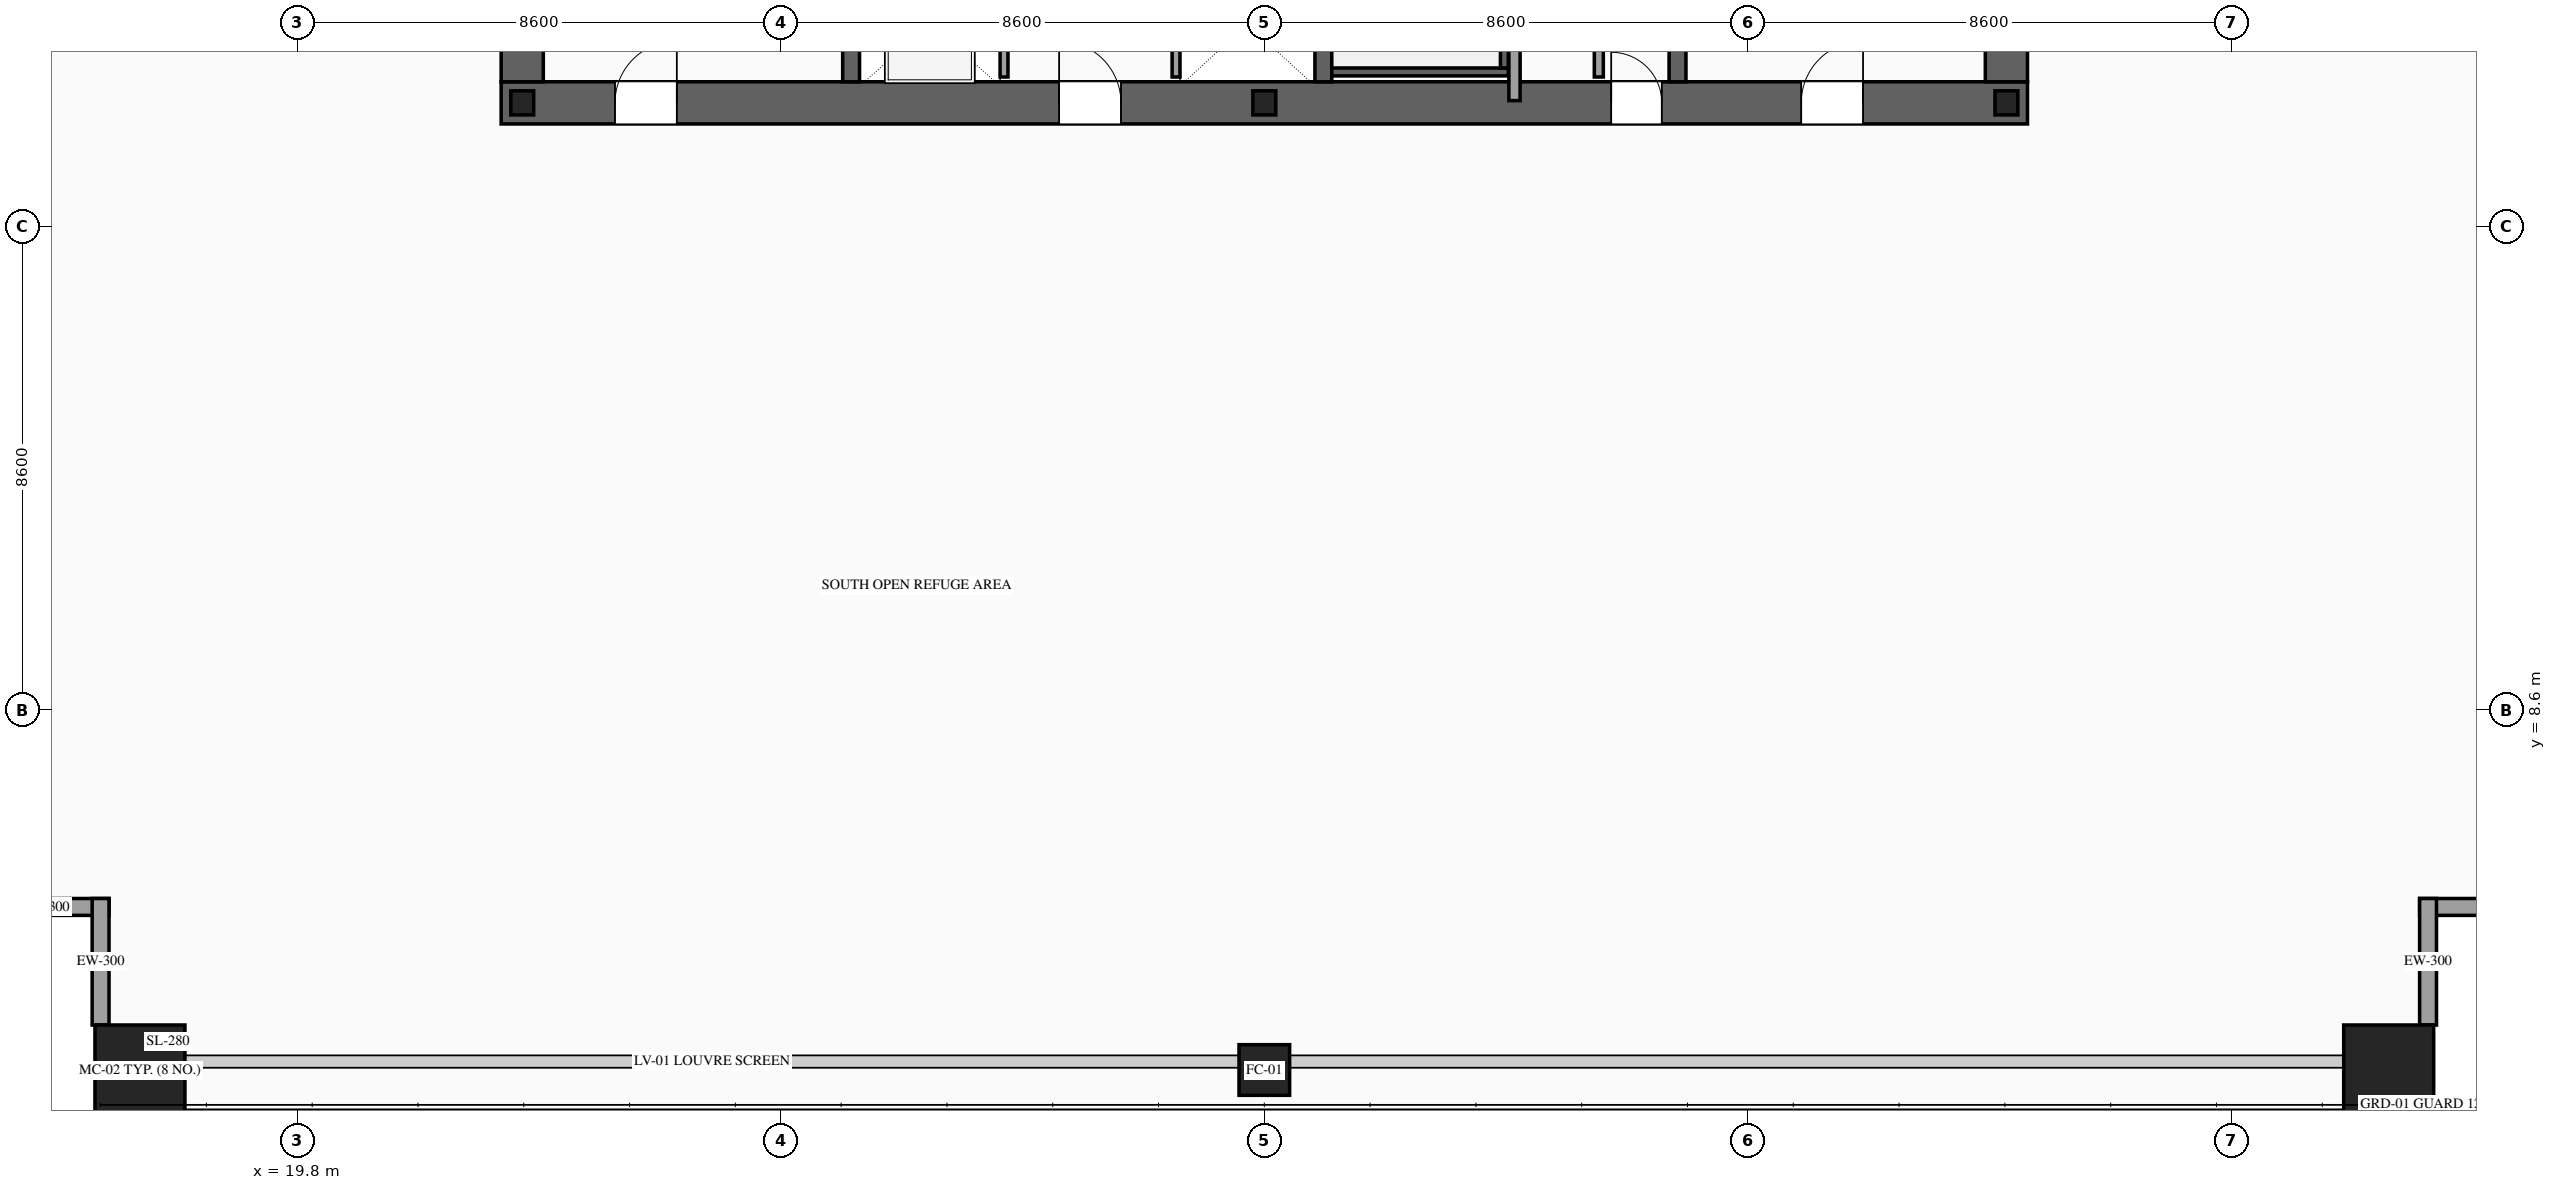
"""IFC4 building model, lengths in metres.
Left out: names, types, materials, properties, quantities, classifications, styles, units other than length and angle.
Written with IfcOpenShell. Run it as: python <this file> out.ifc"""

import sys

from ifc_helpers import new_model, si_unit, direction, frame, frame_2d, origin, origin_2d, place, context, subcontext, project, spatial, rectangle, hollow_rectangle, i_section, extrude, source, transform, mapped, element, fill, save


model = new_model("IFC4")
c1 = context("Model", 3, precision=1e-05, world=origin(), true_north=direction((0.0, 1.0)))
c2 = subcontext(c1, "Body", "Model", "MODEL_VIEW")
j1 = project(units=[si_unit("LENGTHUNIT", "METRE"), si_unit("PLANEANGLEUNIT", "RADIAN")], contexts=[c1])
p1 = place(None, origin())
s1 = spatial("IfcSite", under=j1, at=p1, CompositionType="ELEMENT")
p2 = place(p1, origin())
s2 = spatial("IfcBuilding", under=s1, at=p2, CompositionType="ELEMENT")
p3 = place(p2, frame((0.0, 0.0, 129.8)))
s3 = spatial("IfcBuildingStorey", under=s2, at=p3, CompositionType="ELEMENT", Elevation=129.8)
p4 = place(p3, frame((23.425, 19.4, 0.0), z_axis=(0.0, 0.0, 1.0), x_axis=(1.0, 0.0, 0.0)))
e1 = element("IfcWall", 1, at=p4, inside=s3, PredefinedType="SHEAR", context=c2, shape_type="SweptSolid", body=[
    extrude(rectangle(XDim=27.15, YDim=0.75, at=frame_2d((13.575, 0.0))), origin(), (0.0, 0.0, 1.0), 4.6),
])
p5 = place(p4, frame((2.025, 0.0, 0.0)))
e2 = element("IfcOpeningElement", 2, at=p5, cuts=e1, PredefinedType="OPENING", context=c2, shape_type="SweptSolid", body=[
    extrude(rectangle(XDim=1.1, YDim=2.2, at=frame_2d((0.55, 1.1))), frame((0.0, 0.39, 0.0), z_axis=(0.0, -1.0, 0.0), x_axis=(1.0, 0.0, 0.0)), (0.0, 0.0, 1.0), 0.78),
])
p6 = place(p4, frame((9.925, 0.0, 0.0)))
e3 = element("IfcOpeningElement", 3, at=p6, cuts=e1, PredefinedType="OPENING", context=c2, shape_type="SweptSolid", body=[
    extrude(rectangle(XDim=1.1, YDim=2.2, at=frame_2d((0.55, 1.1))), frame((0.0, 0.39, 0.0), z_axis=(0.0, -1.0, 0.0), x_axis=(1.0, 0.0, 0.0)), (0.0, 0.0, 1.0), 0.78),
])
p7 = place(p4, frame((23.125, 0.0, 0.0)))
e4 = element("IfcOpeningElement", 4, at=p7, cuts=e1, PredefinedType="OPENING", context=c2, shape_type="SweptSolid", body=[
    extrude(rectangle(XDim=1.1, YDim=2.2, at=frame_2d((0.55, 1.1))), frame((0.0, 0.39, 0.0), z_axis=(0.0, -1.0, 0.0), x_axis=(1.0, 0.0, 0.0)), (0.0, 0.0, 1.0), 0.78),
])
p8 = place(p4, frame((19.745, 0.0, 0.0)))
e5 = element("IfcOpeningElement", 5, at=p8, cuts=e1, PredefinedType="OPENING", context=c2, shape_type="SweptSolid", body=[
    extrude(rectangle(XDim=0.9, YDim=2.15, at=frame_2d((0.45, 1.075))), frame((0.0, 0.39, 0.0), z_axis=(0.0, -1.0, 0.0), x_axis=(1.0, 0.0, 0.0)), (0.0, 0.0, 1.0), 0.78),
])
m1 = source(origin(), c2, "Body", "SweptSolid", [
    extrude(rectangle(XDim=12.05, YDim=0.75, at=frame_2d((6.025, 0.0))), origin(), (0.0, 0.0, 1.0), 4.6),
])
for number, where, z_axis, x_axis in (
    (6, (23.8, 19.775, 0.0), (0.0, 0.0, 1.0), (0.0, 1.0, 0.0)),
    (7, (50.2, 19.775, 0.0), (0.0, 0.0, 1.0), (0.0, 1.0, 0.0)),
):
    element("IfcWall", number, at=place(p3, frame(where, z_axis=z_axis, x_axis=x_axis)), inside=s3, PredefinedType="SHEAR", context=c2, shape_type="MappedRepresentation", body=[
        mapped(m1, transform((0.0, 0.0, 0.0), scale=1.0)),
    ])
m2 = source(origin(), c2, "Body", "SweptSolid", [
    extrude(rectangle(XDim=12.05, YDim=0.3, at=frame_2d((6.025, 0.0))), origin(), (0.0, 0.0, 1.0), 4.6),
])
for number, where, z_axis, x_axis in (
    (8, (29.65, 19.775, 0.0), (0.0, 0.0, 1.0), (0.0, 1.0, 0.0)),
    (9, (38.05, 19.775, 0.0), (0.0, 0.0, 1.0), (0.0, 1.0, 0.0)),
    (10, (44.35, 19.775, 0.0), (0.0, 0.0, 1.0), (0.0, 1.0, 0.0)),
):
    element("IfcWall", number, at=place(p3, frame(where, z_axis=z_axis, x_axis=x_axis)), inside=s3, PredefinedType="SOLIDWALL", context=c2, shape_type="MappedRepresentation", body=[
        mapped(m2, transform((0.0, 0.0, 0.0), scale=1.0)),
    ])
m3 = source(origin(), c2, "Body", "SweptSolid", [
    extrude(i_section(OverallWidth=0.407, OverallDepth=0.428, WebThickness=0.02, FlangeThickness=0.035, at=origin_2d()), origin(), (0.0, 0.0, 1.0), 4.6),
])
for number, where, z_axis, x_axis in (
    (11, (23.8, 19.4, 0.0), (0.0, 0.0, 1.0), (1.0, 0.0, 0.0)),
    (12, (37.0, 19.4, 0.0), (0.0, 0.0, 1.0), (1.0, 0.0, 0.0)),
    (13, (50.2, 19.4, 0.0), (0.0, 0.0, 1.0), (1.0, 0.0, 0.0)),
):
    element("IfcColumn", number, at=place(p3, frame(where, z_axis=z_axis, x_axis=x_axis)), inside=s3, PredefinedType="COLUMN", context=c2, shape_type="MappedRepresentation", body=[
        mapped(m3, transform((0.0, 0.0, 0.0), scale=1.0)),
    ])
m4 = source(origin(), c2, "Body", "SweptSolid", [
    extrude(hollow_rectangle(XDim=1.6, YDim=1.6, WallThickness=0.07, at=origin_2d()), origin(), (0.0, 0.0, 1.0), 4.6),
])
p9 = place(p3, frame((17.0, 2.2, 0.0), z_axis=(0.0, 0.0, 1.0), x_axis=(1.0, 0.0, 0.0)))
e14 = element("IfcColumn", 14, at=p9, inside=s3, PredefinedType="COLUMN", context=c2, shape_type="MappedRepresentation", body=[
    mapped(m4, transform((0.0, 0.0, 0.0), scale=1.0)),
])
m5 = source(origin(), c2, "Body", "SweptSolid", [
    extrude(hollow_rectangle(XDim=0.9, YDim=0.9, WallThickness=0.042, at=origin_2d()), origin(), (0.0, 0.0, 1.0), 4.6),
])
p10 = place(p3, frame((37.0, 2.2, 0.0), z_axis=(0.0, 0.0, 1.0), x_axis=(1.0, 0.0, 0.0)))
e15 = element("IfcColumn", 15, at=p10, inside=s3, PredefinedType="COLUMN", context=c2, shape_type="MappedRepresentation", body=[
    mapped(m5, transform((0.0, 0.0, 0.0), scale=1.0)),
])
p11 = place(p3, frame((57.0, 2.2, 0.0), z_axis=(0.0, 0.0, 1.0), x_axis=(1.0, 0.0, 0.0)))
e16 = element("IfcColumn", 16, at=p11, inside=s3, PredefinedType="COLUMN", context=c2, shape_type="MappedRepresentation", body=[
    mapped(m4, transform((0.0, 0.0, 0.0), scale=1.0)),
])
m6 = source(origin(), c2, "Body", "SweptSolid", [
    extrude(rectangle(XDim=2.25, YDim=0.3, at=frame_2d((1.125, 0.0))), origin(), (0.0, 0.0, 1.0), 4.38),
])
for number, where, z_axis, x_axis in (
    (17, (14.2, 5.1, 0.0), (0.0, 0.0, 1.0), (1.0, 0.0, 0.0)),
    (18, (16.3, 5.25, 0.0), (0.0, 0.0, 1.0), (0.0, -1.0, 0.0)),
    (19, (57.55, 5.1, 0.0), (0.0, 0.0, 1.0), (1.0, 0.0, 0.0)),
    (20, (57.7, 3.0, 0.0), (0.0, 0.0, 1.0), (0.0, 1.0, 0.0)),
):
    element("IfcWall", number, at=place(p3, frame(where, z_axis=z_axis, x_axis=x_axis)), inside=s3, PredefinedType="SOLIDWALL", context=c2, shape_type="MappedRepresentation", body=[
        mapped(m6, transform((0.0, 0.0, 0.0), scale=1.0)),
    ])
p12 = place(p3, frame((32.37, 19.86, 0.0), z_axis=(0.0, 0.0, 1.0), x_axis=(0.0, 1.0, 0.0)))
e21 = element("IfcWall", 21, at=p12, inside=s3, PredefinedType="SOLIDWALL", context=c2, shape_type="SweptSolid", body=[
    extrude(rectangle(XDim=2.04, YDim=0.14, at=frame_2d((1.02, 0.0))), origin(), (0.0, 0.0, 1.0), 4.38),
])
p13 = place(p12, frame((0.47, 0.0, 0.0)))
e22 = element("IfcOpeningElement", 22, at=p13, cuts=e21, PredefinedType="OPENING", context=c2, shape_type="SweptSolid", body=[
    extrude(rectangle(XDim=1.1, YDim=2.2, at=frame_2d((0.55, 1.1))), frame((0.0, 0.085, 0.0), z_axis=(0.0, -1.0, 0.0), x_axis=(1.0, 0.0, 0.0)), (0.0, 0.0, 1.0), 0.17),
])
m7 = source(origin(), c2, "Body", "SweptSolid", [
    extrude(rectangle(XDim=2.04, YDim=0.14, at=frame_2d((1.02, 0.0))), origin(), (0.0, 0.0, 1.0), 4.38),
])
p14 = place(p3, frame((35.43, 19.86, 0.0), z_axis=(0.0, 0.0, 1.0), x_axis=(0.0, 1.0, 0.0)))
e23 = element("IfcWall", 23, at=p14, inside=s3, PredefinedType="SOLIDWALL", context=c2, shape_type="MappedRepresentation", body=[
    mapped(m7, transform((0.0, 0.0, 0.0), scale=1.0)),
])
m8 = source(origin(), c2, "Body", "SweptSolid", [
    extrude(rectangle(XDim=3.14, YDim=0.14, at=frame_2d((1.57, 0.0))), origin(), (0.0, 0.0, 1.0), 4.38),
])
p15 = place(p3, frame((38.2, 19.95, 0.0), z_axis=(0.0, 0.0, 1.0), x_axis=(1.0, 0.0, 0.0)))
e24 = element("IfcWall", 24, at=p15, inside=s3, PredefinedType="SOLIDWALL", context=c2, shape_type="MappedRepresentation", body=[
    mapped(m8, transform((0.0, 0.0, 0.0), scale=1.0)),
])
m9 = source(origin(), c2, "Body", "SweptSolid", [
    extrude(rectangle(XDim=8.94, YDim=0.14, at=frame_2d((4.47, 0.0))), origin(), (0.0, 0.0, 1.0), 4.38),
])
p16 = place(p3, frame((41.27, 20.02, 0.0), z_axis=(0.0, 0.0, 1.0), x_axis=(0.0, 1.0, 0.0)))
e25 = element("IfcWall", 25, at=p16, inside=s3, PredefinedType="SOLIDWALL", context=c2, shape_type="MappedRepresentation", body=[
    mapped(m9, transform((0.0, 0.0, 0.0), scale=1.0)),
])
m10 = source(origin(), c2, "Body", "SweptSolid", [
    extrude(rectangle(XDim=1.34, YDim=0.16, at=frame_2d((0.67, 0.0))), origin(), (0.0, 0.0, 1.0), 4.38),
])
p17 = place(p3, frame((42.95, 19.86, 0.0), z_axis=(0.0, 0.0, 1.0), x_axis=(0.0, 1.0, 0.0)))
e26 = element("IfcWall", 26, at=p17, inside=s3, PredefinedType="PARTITIONING", context=c2, shape_type="MappedRepresentation", body=[
    mapped(m10, transform((0.0, 0.0, 0.0), scale=1.0)),
])
m11 = source(origin(), c2, "Body", "SweptSolid", [
    extrude(rectangle(XDim=12.72, YDim=0.2, at=frame_2d((6.36, 0.0))), origin(), (0.0, 0.0, 1.0), 4.38),
])
p18 = place(p3, frame((41.45, 19.44, 0.0), z_axis=(0.0, 0.0, 1.0), x_axis=(0.0, 1.0, 0.0)))
e27 = element("IfcWall", 27, at=p18, inside=s3, PredefinedType="PARTITIONING", context=c2, shape_type="MappedRepresentation", body=[
    mapped(m11, transform((0.0, 0.0, 0.0), scale=1.0)),
])
m12 = source(origin(), c2, "Body", "SweptSolid", [
    extrude(rectangle(XDim=1.1, YDim=2.2, at=frame_2d((0.55, 1.1))), frame((0.0, 0.025, 0.0), z_axis=(0.0, -1.0, 0.0), x_axis=(1.0, 0.0, 0.0)), (0.0, 0.0, 1.0), 0.05),
])
p19 = place(p5, origin())
e28 = element("IfcDoor", 28, at=p19, inside=s3, OperationType="SINGLE_SWING_RIGHT", PredefinedType="DOOR", context=c2, shape_type="MappedRepresentation", body=[
    mapped(m12, transform((0.0, 0.0, 0.0), scale=1.0)),
])
fill(e2, e28)
p20 = place(p6, origin())
e29 = element("IfcDoor", 29, at=p20, inside=s3, OperationType="SINGLE_SWING_LEFT", PredefinedType="DOOR", context=c2, shape_type="MappedRepresentation", body=[
    mapped(m12, transform((0.0, 0.0, 0.0), scale=1.0)),
])
fill(e3, e29)
p21 = place(p7, origin())
e30 = element("IfcDoor", 30, at=p21, inside=s3, OperationType="SINGLE_SWING_RIGHT", PredefinedType="DOOR", context=c2, shape_type="MappedRepresentation", body=[
    mapped(m12, transform((0.0, 0.0, 0.0), scale=1.0)),
])
fill(e4, e30)
m13 = source(origin(), c2, "Body", "SweptSolid", [
    extrude(rectangle(XDim=0.9, YDim=2.15, at=frame_2d((0.45, 1.075))), frame((0.0, 0.025, 0.0), z_axis=(0.0, -1.0, 0.0), x_axis=(1.0, 0.0, 0.0)), (0.0, 0.0, 1.0), 0.05),
])
p22 = place(p8, origin())
e31 = element("IfcDoor", 31, at=p22, inside=s3, OperationType="SINGLE_SWING_LEFT", PredefinedType="DOOR", context=c2, shape_type="MappedRepresentation", body=[
    mapped(m13, transform((0.0, 0.0, 0.0), scale=1.0)),
])
fill(e5, e31)
save(model, sys.argv[1])
